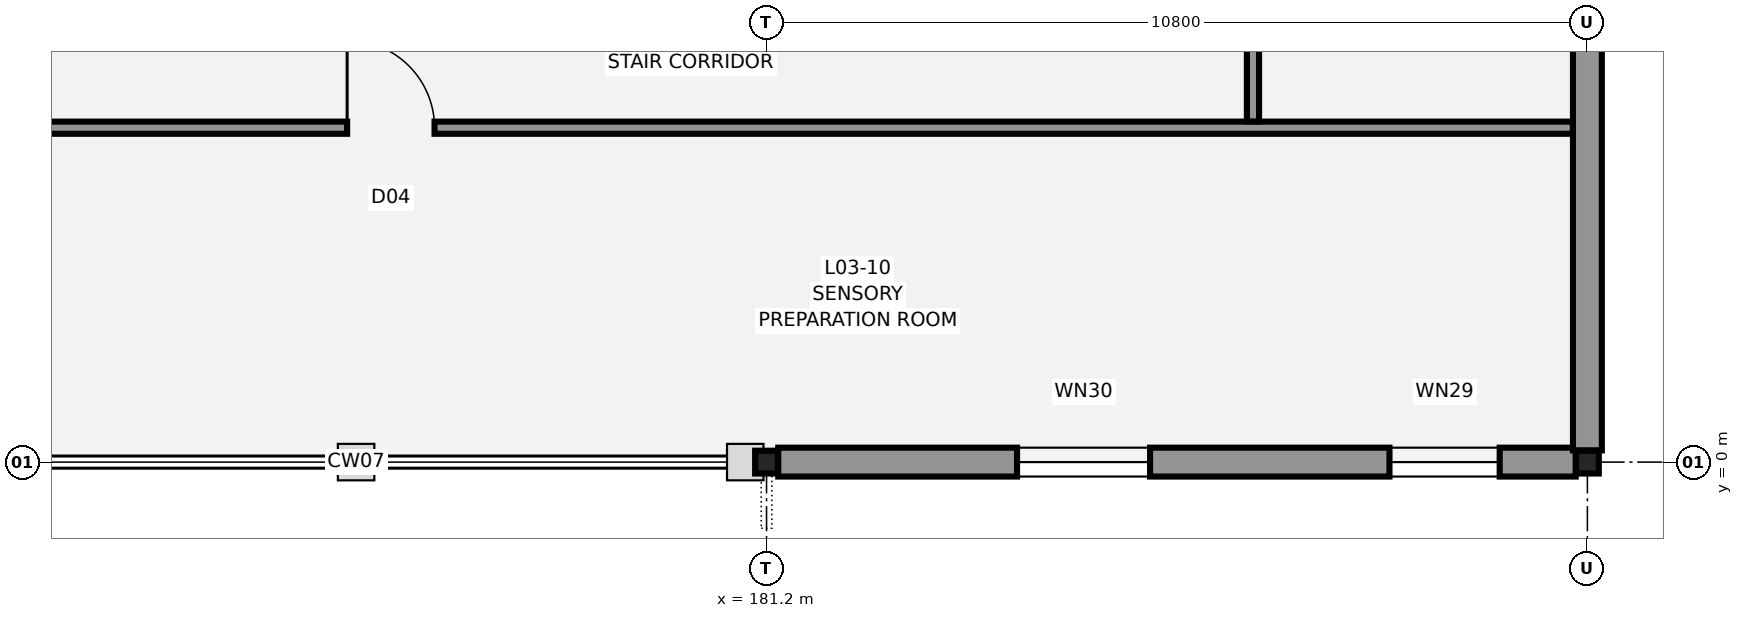
"""IFC4 building model, lengths in metres.
Left out: names, types, materials, properties, quantities, classifications, styles, units other than length and angle.
Written with IfcOpenShell. Run it as: python <this file> out.ifc"""

import sys

from ifc_helpers import new_model, si_unit, direction, frame, frame_2d, origin, origin_2d, place, context, subcontext, project, spatial, rectangle, i_section, extrude, element, fill, save


model = new_model("IFC4")
c1 = context("Model", 3, precision=1e-05, world=origin(), true_north=direction((0.0, 1.0)))
c2 = subcontext(c1, "Body", "Model", "MODEL_VIEW")
j1 = project(units=[si_unit("LENGTHUNIT", "METRE"), si_unit("PLANEANGLEUNIT", "RADIAN")], contexts=[c1])
p1 = place(None, origin())
s1 = spatial("IfcSite", under=j1, at=p1, CompositionType="ELEMENT")
p2 = place(p1, origin())
s2 = spatial("IfcBuilding", under=s1, at=p2, CompositionType="ELEMENT")
p3 = place(p2, frame((0.0, 0.0, 14.4)))
s3 = spatial("IfcBuildingStorey", under=s2, at=p3, CompositionType="ELEMENT", Elevation=14.4)
for number, where, z_axis, x_axis in (
    (1, (181.2, 0.0, 0.0), (0.0, 0.0, 1.0), (1.0, 0.0, 0.0)),
    (2, (192.0, 0.0, 0.0), (0.0, 0.0, 1.0), (1.0, 0.0, 0.0)),
):
    element("IfcColumn", number, at=place(p3, frame(where, z_axis=z_axis, x_axis=x_axis)), inside=s3, PredefinedType="COLUMN", context=c2, shape_type="SweptSolid", body=[
        extrude(i_section(OverallWidth=0.3, OverallDepth=0.3, WebThickness=0.011, FlangeThickness=0.019, FilletRadius=0.027, at=origin_2d()), origin(), (0.0, 0.0, 1.0), 4.2),
    ])
p4 = place(p3, frame((191.846, 0.0, 0.0), z_axis=(0.0, 0.0, 1.0), x_axis=(-1.0, 0.0, 0.0)))
e3 = element("IfcWall", 3, at=p4, inside=s3, PredefinedType="STANDARD", context=c2, shape_type="SweptSolid", body=[
    extrude(rectangle(XDim=10.492, YDim=0.38, at=frame_2d((5.246, 0.0))), origin(), (0.0, 0.0, 1.0), 3.535),
])
p5 = place(p4, frame((1.0, 0.0, 0.8)))
e4 = element("IfcOpeningElement", 4, at=p5, cuts=e3, PredefinedType="OPENING", context=c2, shape_type="SweptSolid", body=[
    extrude(rectangle(XDim=1.45, YDim=1.5, at=frame_2d((0.725, 0.75))), frame((0.0, 0.2, 0.0), z_axis=(0.0, -1.0, 0.0), x_axis=(1.0, 0.0, 0.0)), (0.0, 0.0, 1.0), 0.4),
])
p6 = place(p4, frame((5.6, 0.0, 0.8)))
e5 = element("IfcOpeningElement", 5, at=p6, cuts=e3, PredefinedType="OPENING", context=c2, shape_type="SweptSolid", body=[
    extrude(rectangle(XDim=1.75, YDim=1.5, at=frame_2d((0.875, 0.75))), frame((0.0, 0.2, 0.0), z_axis=(0.0, -1.0, 0.0), x_axis=(1.0, 0.0, 0.0)), (0.0, 0.0, 1.0), 0.4),
])
p7 = place(p3, frame((192.0, 5.846, 0.0), z_axis=(0.0, 0.0, 1.0), x_axis=(0.0, -1.0, 0.0)))
e6 = element("IfcWall", 6, at=p7, inside=s3, PredefinedType="STANDARD", context=c2, shape_type="SweptSolid", body=[
    extrude(rectangle(XDim=5.692, YDim=0.38, at=frame_2d((2.846, 0.0))), origin(), (0.0, 0.0, 1.0), 3.685),
])
p8 = place(p3, frame((159.682, 4.4, 0.0), z_axis=(0.0, 0.0, 1.0), x_axis=(1.0, 0.0, 0.0)))
e7 = element("IfcWall", 7, at=p8, inside=s3, PredefinedType="PARTITIONING", context=c2, shape_type="SweptSolid", body=[
    extrude(rectangle(XDim=32.126, YDim=0.16, at=frame_2d((16.063, 0.0))), origin(), (0.0, 0.0, 1.0), 3.84),
])
p9 = place(p8, frame((16.0, 0.0, 0.0)))
e8 = element("IfcOpeningElement", 8, at=p9, cuts=e7, PredefinedType="OPENING", context=c2, shape_type="SweptSolid", body=[
    extrude(rectangle(XDim=1.15, YDim=2.15, at=frame_2d((0.575, 1.075))), frame((0.0, 0.09, 0.0), z_axis=(0.0, -1.0, 0.0), x_axis=(1.0, 0.0, 0.0)), (0.0, 0.0, 1.0), 0.18),
])
p10 = place(p3, frame((187.6, 4.482, 0.0), z_axis=(0.0, 0.0, 1.0), x_axis=(0.0, 1.0, 0.0)))
e9 = element("IfcWall", 9, at=p10, inside=s3, PredefinedType="PARTITIONING", context=c2, shape_type="SweptSolid", body=[
    extrude(rectangle(XDim=10.918, YDim=0.16, at=frame_2d((5.459, 0.0))), origin(), (0.0, 0.0, 1.0), 3.84),
])
p11 = place(p5, origin())
e10 = element("IfcWindow", 10, at=p11, inside=s3, PartitioningType="SINGLE_PANEL", PredefinedType="WINDOW", context=c2, shape_type="SweptSolid", body=[
    extrude(rectangle(XDim=1.45, YDim=1.5, at=frame_2d((0.725, 0.75))), frame((0.0, 0.03, 0.0), z_axis=(0.0, -1.0, 0.0), x_axis=(1.0, 0.0, 0.0)), (0.0, 0.0, 1.0), 0.06),
])
fill(e4, e10)
p12 = place(p6, origin())
e11 = element("IfcWindow", 11, at=p12, inside=s3, PartitioningType="SINGLE_PANEL", PredefinedType="WINDOW", context=c2, shape_type="SweptSolid", body=[
    extrude(rectangle(XDim=1.75, YDim=1.5, at=frame_2d((0.875, 0.75))), frame((0.0, 0.03, 0.0), z_axis=(0.0, -1.0, 0.0), x_axis=(1.0, 0.0, 0.0)), (0.0, 0.0, 1.0), 0.06),
])
fill(e5, e11)
p13 = place(p9, origin())
e12 = element("IfcDoor", 12, at=p13, inside=s3, OperationType="SINGLE_SWING_LEFT", PredefinedType="DOOR", context=c2, shape_type="SweptSolid", body=[
    extrude(rectangle(XDim=1.15, YDim=2.15, at=frame_2d((0.575, 1.075))), frame((0.0, 0.025, 0.0), z_axis=(0.0, -1.0, 0.0), x_axis=(1.0, 0.0, 0.0)), (0.0, 0.0, 1.0), 0.05),
])
fill(e8, e12)
save(model, sys.argv[1])
